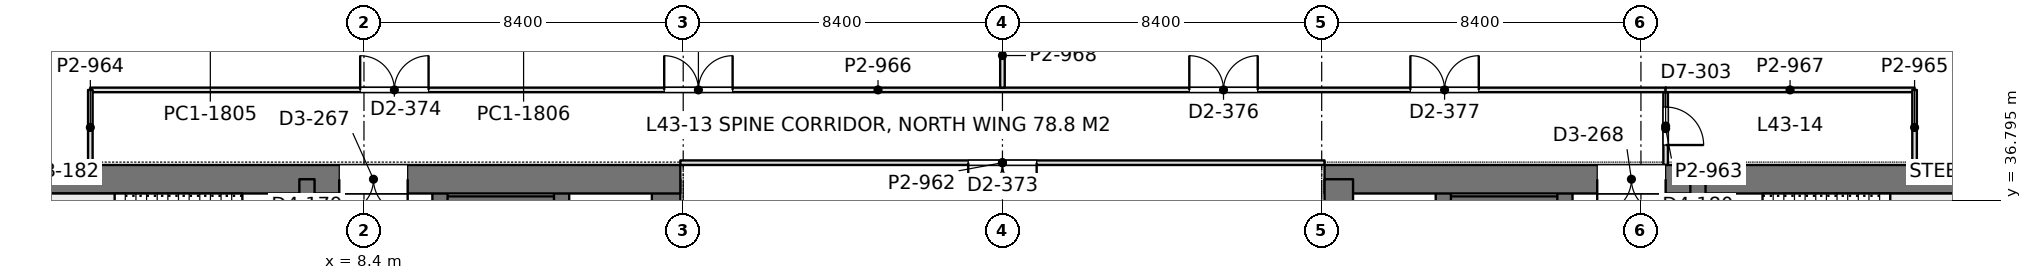
"""IFC4 building model, lengths in metres.
Left out: names, types, materials, properties, quantities, classifications, styles, units other than length and angle.
Written with IfcOpenShell. Run it as: python <this file> out.ifc"""

import sys

from ifc_helpers import new_model, si_unit, direction, frame, frame_2d, origin, place, context, subcontext, project, spatial, rectangle, extrude, element, fill, save


model = new_model("IFC4")
c1 = context("Model", 3, precision=1e-05, world=origin(), true_north=direction((0.0, 1.0)))
c2 = subcontext(c1, "Body", "Model", "MODEL_VIEW")
j1 = project(units=[si_unit("LENGTHUNIT", "METRE"), si_unit("PLANEANGLEUNIT", "RADIAN")], contexts=[c1])
p1 = place(None, origin())
s1 = spatial("IfcSite", under=j1, at=p1, CompositionType="ELEMENT")
p2 = place(p1, origin())
s2 = spatial("IfcBuilding", under=s1, at=p2, CompositionType="ELEMENT")
p3 = place(p2, frame((0.0, 0.0, 190.2)))
s3 = spatial("IfcBuildingStorey", under=s2, at=p3, CompositionType="ELEMENT", Elevation=190.2)
p4 = place(p3, frame((-1.125, 37.35, 0.0), z_axis=(0.0, 0.0, 1.0), x_axis=(1.0, 0.0, 0.0)))
e1 = element("IfcWall", 1, at=p4, inside=s3, PredefinedType="SHEAR", context=c2, shape_type="SweptSolid", body=[
    extrude(rectangle(XDim=17.85, YDim=0.75, at=frame_2d((8.925, 0.0))), origin(), (0.0, 0.0, 1.0), 4.2),
])
p5 = place(p4, frame((8.875, 0.0, 0.0)))
e2 = element("IfcOpeningElement", 2, at=p5, cuts=e1, PredefinedType="OPENING", context=c2, shape_type="SweptSolid", body=[
    extrude(rectangle(XDim=1.8, YDim=2.4, at=frame_2d((0.9, 1.2))), frame((0.0, 0.385, 0.0), z_axis=(0.0, -1.0, 0.0), x_axis=(1.0, 0.0, 0.0)), (0.0, 0.0, 1.0), 0.77),
])
p6 = place(p3, frame((16.35, 27.8, 0.0), z_axis=(0.0, 0.0, 1.0), x_axis=(0.0, 1.0, 0.0)))
e3 = element("IfcWall", 3, at=p6, inside=s3, PredefinedType="SHEAR", context=c2, shape_type="SweptSolid", body=[
    extrude(rectangle(XDim=9.55, YDim=0.75, at=frame_2d((4.775, 0.0))), origin(), (0.0, 0.0, 1.0), 4.2),
])
p7 = place(p3, frame((6.9, 13.05, 0.0), z_axis=(0.0, 0.0, 1.0), x_axis=(0.0, 1.0, 0.0)))
e4 = element("IfcWall", 4, at=p7, inside=s3, PredefinedType="SHEAR", context=c2, shape_type="SweptSolid", body=[
    extrude(rectangle(XDim=24.3, YDim=0.4, at=frame_2d((12.15, 0.0))), origin(), (0.0, 0.0, 1.0), 4.2),
])
p8 = place(p7, frame((1.3, 0.0, 0.0)))
e5 = element("IfcOpeningElement", 5, at=p8, cuts=e4, PredefinedType="OPENING", context=c2, shape_type="SweptSolid", body=[
    extrude(rectangle(XDim=1.0, YDim=2.2, at=frame_2d((0.5, 1.1))), frame((0.0, 0.21, 0.0), z_axis=(0.0, -1.0, 0.0), x_axis=(1.0, 0.0, 0.0)), (0.0, 0.0, 1.0), 0.42),
])
p9 = place(p7, frame((22.0, 0.0, 0.0)))
e6 = element("IfcOpeningElement", 6, at=p9, cuts=e4, PredefinedType="OPENING", context=c2, shape_type="SweptSolid", body=[
    extrude(rectangle(XDim=1.0, YDim=2.2, at=frame_2d((0.5, 1.1))), frame((0.0, 0.21, 0.0), z_axis=(0.0, -1.0, 0.0), x_axis=(1.0, 0.0, 0.0)), (0.0, 0.0, 1.0), 0.42),
])
p10 = place(p7, frame((5.55, 0.0, 0.0)))
e7 = element("IfcOpeningElement", 7, at=p10, cuts=e4, PredefinedType="OPENING", context=c2, shape_type="SweptSolid", body=[
    extrude(rectangle(XDim=1.0, YDim=2.2, at=frame_2d((0.5, 1.1))), frame((0.0, 0.21, 0.0), z_axis=(0.0, -1.0, 0.0), x_axis=(1.0, 0.0, 0.0)), (0.0, 0.0, 1.0), 0.42),
])
p11 = place(p7, frame((9.55, 0.0, 0.0)))
e8 = element("IfcOpeningElement", 8, at=p11, cuts=e4, PredefinedType="OPENING", context=c2, shape_type="SweptSolid", body=[
    extrude(rectangle(XDim=1.0, YDim=2.2, at=frame_2d((0.5, 1.1))), frame((0.0, 0.21, 0.0), z_axis=(0.0, -1.0, 0.0), x_axis=(1.0, 0.0, 0.0)), (0.0, 0.0, 1.0), 0.42),
])
p12 = place(p7, frame((12.8, 0.0, 0.0)))
e9 = element("IfcOpeningElement", 9, at=p12, cuts=e4, PredefinedType="OPENING", context=c2, shape_type="SweptSolid", body=[
    extrude(rectangle(XDim=1.1, YDim=2.2, at=frame_2d((0.55, 1.1))), frame((0.0, 0.21, 0.0), z_axis=(0.0, -1.0, 0.0), x_axis=(1.0, 0.0, 0.0)), (0.0, 0.0, 1.0), 0.42),
])
p13 = place(p7, frame((15.538, 0.0, 0.0)))
e10 = element("IfcOpeningElement", 10, at=p13, cuts=e4, PredefinedType="OPENING", context=c2, shape_type="SweptSolid", body=[
    extrude(rectangle(XDim=1.1, YDim=2.2, at=frame_2d((0.55, 1.1))), frame((0.0, 0.21, 0.0), z_axis=(0.0, -1.0, 0.0), x_axis=(1.0, 0.0, 0.0)), (0.0, 0.0, 1.0), 0.42),
])
p14 = place(p7, frame((18.262, 0.0, 0.0)))
e11 = element("IfcOpeningElement", 11, at=p14, cuts=e4, PredefinedType="OPENING", context=c2, shape_type="SweptSolid", body=[
    extrude(rectangle(XDim=1.1, YDim=2.2, at=frame_2d((0.55, 1.1))), frame((0.0, 0.21, 0.0), z_axis=(0.0, -1.0, 0.0), x_axis=(1.0, 0.0, 0.0)), (0.0, 0.0, 1.0), 0.42),
])
p15 = place(p3, frame((10.4, 13.05, 0.0), z_axis=(0.0, 0.0, 1.0), x_axis=(0.0, 1.0, 0.0)))
e12 = element("IfcWall", 12, at=p15, inside=s3, PredefinedType="SHEAR", context=c2, shape_type="SweptSolid", body=[
    extrude(rectangle(XDim=24.3, YDim=0.4, at=frame_2d((12.15, 0.0))), origin(), (0.0, 0.0, 1.0), 4.2),
])
p16 = place(p15, frame((15.75, 0.0, 0.0)))
e13 = element("IfcOpeningElement", 13, at=p16, cuts=e12, PredefinedType="OPENING", context=c2, shape_type="SweptSolid", body=[
    extrude(rectangle(XDim=1.1, YDim=2.2, at=frame_2d((0.55, 1.1))), frame((0.0, 0.21, 0.0), z_axis=(0.0, -1.0, 0.0), x_axis=(1.0, 0.0, 0.0)), (0.0, 0.0, 1.0), 0.42),
])
p17 = place(p15, frame((18.6, 0.0, 0.0)))
e14 = element("IfcOpeningElement", 14, at=p17, cuts=e12, PredefinedType="OPENING", context=c2, shape_type="SweptSolid", body=[
    extrude(rectangle(XDim=1.1, YDim=2.2, at=frame_2d((0.55, 1.1))), frame((0.0, 0.21, 0.0), z_axis=(0.0, -1.0, 0.0), x_axis=(1.0, 0.0, 0.0)), (0.0, 0.0, 1.0), 0.42),
])
p18 = place(p15, frame((21.45, 0.0, 0.0)))
e15 = element("IfcOpeningElement", 15, at=p18, cuts=e12, PredefinedType="OPENING", context=c2, shape_type="SweptSolid", body=[
    extrude(rectangle(XDim=1.1, YDim=2.2, at=frame_2d((0.55, 1.1))), frame((0.0, 0.21, 0.0), z_axis=(0.0, -1.0, 0.0), x_axis=(1.0, 0.0, 0.0)), (0.0, 0.0, 1.0), 0.42),
])
p19 = place(p15, frame((8.65, 0.0, 0.0)))
e16 = element("IfcOpeningElement", 16, at=p19, cuts=e12, PredefinedType="OPENING", context=c2, shape_type="SweptSolid", body=[
    extrude(rectangle(XDim=1.8, YDim=2.4, at=frame_2d((0.9, 1.2))), frame((0.0, 0.21, 0.0), z_axis=(0.0, -1.0, 0.0), x_axis=(1.0, 0.0, 0.0)), (0.0, 0.0, 1.0), 0.42),
])
p20 = place(p3, frame((13.6, 27.925, 0.0), z_axis=(0.0, 0.0, 1.0), x_axis=(0.0, 1.0, 0.0)))
e17 = element("IfcWall", 17, at=p20, inside=s3, PredefinedType="SHEAR", context=c2, shape_type="SweptSolid", body=[
    extrude(rectangle(XDim=9.425, YDim=0.4, at=frame_2d((4.712, 0.0))), origin(), (0.0, 0.0, 1.0), 4.2),
])
p21 = place(p3, frame((10.4, 36.625, 0.0), z_axis=(0.0, 0.0, 1.0), x_axis=(1.0, 0.0, 0.0)))
e18 = element("IfcWall", 18, at=p21, inside=s3, PredefinedType="SHEAR", context=c2, shape_type="SweptSolid", body=[
    extrude(rectangle(XDim=3.2, YDim=0.55, at=frame_2d((1.6, 0.0))), origin(), (0.0, 0.0, 1.0), 4.2),
])
p22 = place(p3, frame((33.675, 37.35, 0.0), z_axis=(0.0, 0.0, 1.0), x_axis=(1.0, 0.0, 0.0)))
e19 = element("IfcWall", 19, at=p22, inside=s3, PredefinedType="SHEAR", context=c2, shape_type="SweptSolid", body=[
    extrude(rectangle(XDim=17.85, YDim=0.75, at=frame_2d((8.925, 0.0))), origin(), (0.0, 0.0, 1.0), 4.2),
])
p23 = place(p22, frame((7.175, 0.0, 0.0)))
e20 = element("IfcOpeningElement", 20, at=p23, cuts=e19, PredefinedType="OPENING", context=c2, shape_type="SweptSolid", body=[
    extrude(rectangle(XDim=1.8, YDim=2.4, at=frame_2d((0.9, 1.2))), frame((0.0, 0.385, 0.0), z_axis=(0.0, -1.0, 0.0), x_axis=(1.0, 0.0, 0.0)), (0.0, 0.0, 1.0), 0.77),
])
p24 = place(p3, frame((34.05, 27.8, 0.0), z_axis=(0.0, 0.0, 1.0), x_axis=(0.0, 1.0, 0.0)))
e21 = element("IfcWall", 21, at=p24, inside=s3, PredefinedType="SHEAR", context=c2, shape_type="SweptSolid", body=[
    extrude(rectangle(XDim=9.55, YDim=0.75, at=frame_2d((4.775, 0.0))), origin(), (0.0, 0.0, 1.0), 4.2),
])
p25 = place(p3, frame((43.5, 13.05, 0.0), z_axis=(0.0, 0.0, 1.0), x_axis=(0.0, 1.0, 0.0)))
e22 = element("IfcWall", 22, at=p25, inside=s3, PredefinedType="SHEAR", context=c2, shape_type="SweptSolid", body=[
    extrude(rectangle(XDim=24.3, YDim=0.4, at=frame_2d((12.15, 0.0))), origin(), (0.0, 0.0, 1.0), 4.2),
])
p26 = place(p25, frame((1.3, 0.0, 0.0)))
e23 = element("IfcOpeningElement", 23, at=p26, cuts=e22, PredefinedType="OPENING", context=c2, shape_type="SweptSolid", body=[
    extrude(rectangle(XDim=1.0, YDim=2.2, at=frame_2d((0.5, 1.1))), frame((0.0, 0.21, 0.0), z_axis=(0.0, -1.0, 0.0), x_axis=(1.0, 0.0, 0.0)), (0.0, 0.0, 1.0), 0.42),
])
p27 = place(p25, frame((22.0, 0.0, 0.0)))
e24 = element("IfcOpeningElement", 24, at=p27, cuts=e22, PredefinedType="OPENING", context=c2, shape_type="SweptSolid", body=[
    extrude(rectangle(XDim=1.0, YDim=2.2, at=frame_2d((0.5, 1.1))), frame((0.0, 0.21, 0.0), z_axis=(0.0, -1.0, 0.0), x_axis=(1.0, 0.0, 0.0)), (0.0, 0.0, 1.0), 0.42),
])
p28 = place(p25, frame((5.55, 0.0, 0.0)))
e25 = element("IfcOpeningElement", 25, at=p28, cuts=e22, PredefinedType="OPENING", context=c2, shape_type="SweptSolid", body=[
    extrude(rectangle(XDim=1.0, YDim=2.2, at=frame_2d((0.5, 1.1))), frame((0.0, 0.21, 0.0), z_axis=(0.0, -1.0, 0.0), x_axis=(1.0, 0.0, 0.0)), (0.0, 0.0, 1.0), 0.42),
])
p29 = place(p25, frame((9.55, 0.0, 0.0)))
e26 = element("IfcOpeningElement", 26, at=p29, cuts=e22, PredefinedType="OPENING", context=c2, shape_type="SweptSolid", body=[
    extrude(rectangle(XDim=1.0, YDim=2.2, at=frame_2d((0.5, 1.1))), frame((0.0, 0.21, 0.0), z_axis=(0.0, -1.0, 0.0), x_axis=(1.0, 0.0, 0.0)), (0.0, 0.0, 1.0), 0.42),
])
p30 = place(p25, frame((12.8, 0.0, 0.0)))
e27 = element("IfcOpeningElement", 27, at=p30, cuts=e22, PredefinedType="OPENING", context=c2, shape_type="SweptSolid", body=[
    extrude(rectangle(XDim=1.1, YDim=2.2, at=frame_2d((0.55, 1.1))), frame((0.0, 0.21, 0.0), z_axis=(0.0, -1.0, 0.0), x_axis=(1.0, 0.0, 0.0)), (0.0, 0.0, 1.0), 0.42),
])
p31 = place(p25, frame((15.538, 0.0, 0.0)))
e28 = element("IfcOpeningElement", 28, at=p31, cuts=e22, PredefinedType="OPENING", context=c2, shape_type="SweptSolid", body=[
    extrude(rectangle(XDim=1.1, YDim=2.2, at=frame_2d((0.55, 1.1))), frame((0.0, 0.21, 0.0), z_axis=(0.0, -1.0, 0.0), x_axis=(1.0, 0.0, 0.0)), (0.0, 0.0, 1.0), 0.42),
])
p32 = place(p25, frame((18.262, 0.0, 0.0)))
e29 = element("IfcOpeningElement", 29, at=p32, cuts=e22, PredefinedType="OPENING", context=c2, shape_type="SweptSolid", body=[
    extrude(rectangle(XDim=1.1, YDim=2.2, at=frame_2d((0.55, 1.1))), frame((0.0, 0.21, 0.0), z_axis=(0.0, -1.0, 0.0), x_axis=(1.0, 0.0, 0.0)), (0.0, 0.0, 1.0), 0.42),
])
p33 = place(p3, frame((40.0, 13.05, 0.0), z_axis=(0.0, 0.0, 1.0), x_axis=(0.0, 1.0, 0.0)))
e30 = element("IfcWall", 30, at=p33, inside=s3, PredefinedType="SHEAR", context=c2, shape_type="SweptSolid", body=[
    extrude(rectangle(XDim=24.3, YDim=0.4, at=frame_2d((12.15, 0.0))), origin(), (0.0, 0.0, 1.0), 4.2),
])
p34 = place(p33, frame((15.75, 0.0, 0.0)))
e31 = element("IfcOpeningElement", 31, at=p34, cuts=e30, PredefinedType="OPENING", context=c2, shape_type="SweptSolid", body=[
    extrude(rectangle(XDim=1.1, YDim=2.2, at=frame_2d((0.55, 1.1))), frame((0.0, 0.21, 0.0), z_axis=(0.0, -1.0, 0.0), x_axis=(1.0, 0.0, 0.0)), (0.0, 0.0, 1.0), 0.42),
])
p35 = place(p33, frame((18.6, 0.0, 0.0)))
e32 = element("IfcOpeningElement", 32, at=p35, cuts=e30, PredefinedType="OPENING", context=c2, shape_type="SweptSolid", body=[
    extrude(rectangle(XDim=1.1, YDim=2.2, at=frame_2d((0.55, 1.1))), frame((0.0, 0.21, 0.0), z_axis=(0.0, -1.0, 0.0), x_axis=(1.0, 0.0, 0.0)), (0.0, 0.0, 1.0), 0.42),
])
p36 = place(p33, frame((21.45, 0.0, 0.0)))
e33 = element("IfcOpeningElement", 33, at=p36, cuts=e30, PredefinedType="OPENING", context=c2, shape_type="SweptSolid", body=[
    extrude(rectangle(XDim=1.1, YDim=2.2, at=frame_2d((0.55, 1.1))), frame((0.0, 0.21, 0.0), z_axis=(0.0, -1.0, 0.0), x_axis=(1.0, 0.0, 0.0)), (0.0, 0.0, 1.0), 0.42),
])
p37 = place(p33, frame((8.65, 0.0, 0.0)))
e34 = element("IfcOpeningElement", 34, at=p37, cuts=e30, PredefinedType="OPENING", context=c2, shape_type="SweptSolid", body=[
    extrude(rectangle(XDim=1.8, YDim=2.4, at=frame_2d((0.9, 1.2))), frame((0.0, 0.21, 0.0), z_axis=(0.0, -1.0, 0.0), x_axis=(1.0, 0.0, 0.0)), (0.0, 0.0, 1.0), 0.42),
])
p38 = place(p3, frame((36.8, 27.925, 0.0), z_axis=(0.0, 0.0, 1.0), x_axis=(0.0, 1.0, 0.0)))
e35 = element("IfcWall", 35, at=p38, inside=s3, PredefinedType="SHEAR", context=c2, shape_type="SweptSolid", body=[
    extrude(rectangle(XDim=9.425, YDim=0.4, at=frame_2d((4.712, 0.0))), origin(), (0.0, 0.0, 1.0), 4.2),
])
p39 = place(p3, frame((40.0, 36.625, 0.0), z_axis=(0.0, 0.0, 1.0), x_axis=(-1.0, 0.0, 0.0)))
e36 = element("IfcWall", 36, at=p39, inside=s3, PredefinedType="SHEAR", context=c2, shape_type="SweptSolid", body=[
    extrude(rectangle(XDim=3.2, YDim=0.55, at=frame_2d((1.6, 0.0))), origin(), (0.0, 0.0, 1.0), 4.2),
])
p40 = place(p3, frame((25.2, 39.758, 0.0), z_axis=(0.0, 0.0, 1.0), x_axis=(0.0, 1.0, 0.0)))
e37 = element("IfcWall", 37, at=p40, inside=s3, PredefinedType="PARTITIONING", context=c2, shape_type="SweptSolid", body=[
    extrude(rectangle(XDim=1.693, YDim=0.12, at=frame_2d((0.846, 0.0))), origin(), (0.0, 0.0, 1.0), 3.55),
])
p41 = place(p3, frame((1.2, 39.7, 0.0), z_axis=(0.0, 0.0, 1.0), x_axis=(1.0, 0.0, 0.0)))
e38 = element("IfcWall", 38, at=p41, inside=s3, PredefinedType="PARTITIONING", context=c2, shape_type="SweptSolid", body=[
    extrude(rectangle(XDim=41.452, YDim=0.12, at=frame_2d((20.726, 0.0))), origin(), (0.0, 0.0, 1.0), 3.55),
])
p42 = place(p41, frame((7.1, 0.0, 0.0)))
e39 = element("IfcOpeningElement", 39, at=p42, cuts=e38, PredefinedType="OPENING", context=c2, shape_type="SweptSolid", body=[
    extrude(rectangle(XDim=1.8, YDim=2.2, at=frame_2d((0.9, 1.1))), frame((0.0, 0.07, 0.0), z_axis=(0.0, -1.0, 0.0), x_axis=(1.0, 0.0, 0.0)), (0.0, 0.0, 1.0), 0.14),
])
p43 = place(p41, frame((15.1, 0.0, 0.0)))
e40 = element("IfcOpeningElement", 40, at=p43, cuts=e38, PredefinedType="OPENING", context=c2, shape_type="SweptSolid", body=[
    extrude(rectangle(XDim=1.8, YDim=2.2, at=frame_2d((0.9, 1.1))), frame((0.0, 0.07, 0.0), z_axis=(0.0, -1.0, 0.0), x_axis=(1.0, 0.0, 0.0)), (0.0, 0.0, 1.0), 0.14),
])
p44 = place(p41, frame((28.917, 0.0, 0.0)))
e41 = element("IfcOpeningElement", 41, at=p44, cuts=e38, PredefinedType="OPENING", context=c2, shape_type="SweptSolid", body=[
    extrude(rectangle(XDim=1.8, YDim=2.2, at=frame_2d((0.9, 1.1))), frame((0.0, 0.07, 0.0), z_axis=(0.0, -1.0, 0.0), x_axis=(1.0, 0.0, 0.0)), (0.0, 0.0, 1.0), 0.14),
])
p45 = place(p41, frame((34.733, 0.0, 0.0)))
e42 = element("IfcOpeningElement", 42, at=p45, cuts=e38, PredefinedType="OPENING", context=c2, shape_type="SweptSolid", body=[
    extrude(rectangle(XDim=1.8, YDim=2.2, at=frame_2d((0.9, 1.1))), frame((0.0, 0.07, 0.0), z_axis=(0.0, -1.0, 0.0), x_axis=(1.0, 0.0, 0.0)), (0.0, 0.0, 1.0), 0.14),
])
p46 = place(p3, frame((1.2, 37.724, 0.0), z_axis=(0.0, 0.0, 1.0), x_axis=(0.0, 1.0, 0.0)))
e43 = element("IfcWall", 43, at=p46, inside=s3, PredefinedType="PARTITIONING", context=c2, shape_type="SweptSolid", body=[
    extrude(rectangle(XDim=1.976, YDim=0.12, at=frame_2d((0.988, 0.0))), origin(), (0.0, 0.0, 1.0), 4.05),
])
p47 = place(p3, frame((42.65, 37.724, 0.0), z_axis=(0.0, 0.0, 1.0), x_axis=(0.0, 1.0, 0.0)))
e44 = element("IfcWall", 44, at=p47, inside=s3, PredefinedType="PARTITIONING", context=c2, shape_type="SweptSolid", body=[
    extrude(rectangle(XDim=1.918, YDim=0.12, at=frame_2d((0.959, 0.0))), origin(), (0.0, 0.0, 1.0), 4.05),
])
p48 = place(p47, frame((0.526, 0.0, 0.0)))
e45 = element("IfcOpeningElement", 45, at=p48, cuts=e44, PredefinedType="OPENING", context=c2, shape_type="SweptSolid", body=[
    extrude(rectangle(XDim=1.0, YDim=2.4, at=frame_2d((0.5, 1.2))), frame((0.0, 0.07, 0.0), z_axis=(0.0, -1.0, 0.0), x_axis=(1.0, 0.0, 0.0)), (0.0, 0.0, 1.0), 0.14),
])
p49 = place(p3, frame((42.648, 39.7, 0.0), z_axis=(0.0, 0.0, 1.0), x_axis=(1.0, 0.0, 0.0)))
e46 = element("IfcWall", 46, at=p49, inside=s3, PredefinedType="PARTITIONING", context=c2, shape_type="SweptSolid", body=[
    extrude(rectangle(XDim=6.552, YDim=0.12, at=frame_2d((3.276, 0.0))), origin(), (0.0, 0.0, 1.0), 3.69),
])
p50 = place(p3, frame((49.2, 37.724, 0.0), z_axis=(0.0, 0.0, 1.0), x_axis=(0.0, 1.0, 0.0)))
e47 = element("IfcWall", 47, at=p50, inside=s3, PredefinedType="PARTITIONING", context=c2, shape_type="SweptSolid", body=[
    extrude(rectangle(XDim=1.976, YDim=0.12, at=frame_2d((0.988, 0.0))), origin(), (0.0, 0.0, 1.0), 4.05),
])
p51 = place(p3, frame((16.725, 37.785, 0.0), z_axis=(0.0, 0.0, 1.0), x_axis=(1.0, 0.0, 0.0)))
e48 = element("IfcWall", 48, at=p51, inside=s3, PredefinedType="PARTITIONING", context=c2, shape_type="SweptSolid", body=[
    extrude(rectangle(XDim=16.95, YDim=0.12, at=frame_2d((8.475, 0.0))), origin(), (0.0, 0.0, 1.0), 3.55),
])
p52 = place(p51, frame((7.575, 0.0, 0.0)))
e49 = element("IfcOpeningElement", 49, at=p52, cuts=e48, PredefinedType="OPENING", context=c2, shape_type="SweptSolid", body=[
    extrude(rectangle(XDim=1.8, YDim=2.2, at=frame_2d((0.9, 1.1))), frame((0.0, 0.07, 0.0), z_axis=(0.0, -1.0, 0.0), x_axis=(1.0, 0.0, 0.0)), (0.0, 0.0, 1.0), 0.14),
])
p53 = place(p5, frame((1.8, 0.0, 0.0), z_axis=(0.0, 0.0, 1.0), x_axis=(-1.0, 0.0, 0.0)))
e50 = element("IfcDoor", 50, at=p53, inside=s3, OperationType="DOUBLE_DOOR_SINGLE_SWING", PredefinedType="DOOR", context=c2, shape_type="SweptSolid", body=[
    extrude(rectangle(XDim=1.8, YDim=2.4, at=frame_2d((0.9, 1.2))), frame((0.0, 0.025, 0.0), z_axis=(0.0, -1.0, 0.0), x_axis=(1.0, 0.0, 0.0)), (0.0, 0.0, 1.0), 0.05),
])
fill(e2, e50)
p54 = place(p23, frame((1.8, 0.0, 0.0), z_axis=(0.0, 0.0, 1.0), x_axis=(-1.0, 0.0, 0.0)))
e51 = element("IfcDoor", 51, at=p54, inside=s3, OperationType="DOUBLE_DOOR_SINGLE_SWING", PredefinedType="DOOR", context=c2, shape_type="SweptSolid", body=[
    extrude(rectangle(XDim=1.8, YDim=2.4, at=frame_2d((0.9, 1.2))), frame((0.0, 0.025, 0.0), z_axis=(0.0, -1.0, 0.0), x_axis=(1.0, 0.0, 0.0)), (0.0, 0.0, 1.0), 0.05),
])
fill(e20, e51)
p55 = place(p42, origin())
e52 = element("IfcDoor", 52, at=p55, inside=s3, OperationType="DOUBLE_DOOR_SINGLE_SWING", PredefinedType="DOOR", context=c2, shape_type="SweptSolid", body=[
    extrude(rectangle(XDim=1.8, YDim=2.2, at=frame_2d((0.9, 1.1))), frame((0.0, 0.025, 0.0), z_axis=(0.0, -1.0, 0.0), x_axis=(1.0, 0.0, 0.0)), (0.0, 0.0, 1.0), 0.05),
])
fill(e39, e52)
p56 = place(p43, origin())
e53 = element("IfcDoor", 53, at=p56, inside=s3, OperationType="DOUBLE_DOOR_SINGLE_SWING", PredefinedType="DOOR", context=c2, shape_type="SweptSolid", body=[
    extrude(rectangle(XDim=1.8, YDim=2.2, at=frame_2d((0.9, 1.1))), frame((0.0, 0.025, 0.0), z_axis=(0.0, -1.0, 0.0), x_axis=(1.0, 0.0, 0.0)), (0.0, 0.0, 1.0), 0.05),
])
fill(e40, e53)
p57 = place(p44, origin())
e54 = element("IfcDoor", 54, at=p57, inside=s3, OperationType="DOUBLE_DOOR_SINGLE_SWING", PredefinedType="DOOR", context=c2, shape_type="SweptSolid", body=[
    extrude(rectangle(XDim=1.8, YDim=2.2, at=frame_2d((0.9, 1.1))), frame((0.0, 0.025, 0.0), z_axis=(0.0, -1.0, 0.0), x_axis=(1.0, 0.0, 0.0)), (0.0, 0.0, 1.0), 0.05),
])
fill(e41, e54)
p58 = place(p45, origin())
e55 = element("IfcDoor", 55, at=p58, inside=s3, OperationType="DOUBLE_DOOR_SINGLE_SWING", PredefinedType="DOOR", context=c2, shape_type="SweptSolid", body=[
    extrude(rectangle(XDim=1.8, YDim=2.2, at=frame_2d((0.9, 1.1))), frame((0.0, 0.025, 0.0), z_axis=(0.0, -1.0, 0.0), x_axis=(1.0, 0.0, 0.0)), (0.0, 0.0, 1.0), 0.05),
])
fill(e42, e55)
p59 = place(p48, frame((1.0, 0.0, 0.0), z_axis=(0.0, 0.0, 1.0), x_axis=(-1.0, 0.0, 0.0)))
e56 = element("IfcDoor", 56, at=p59, inside=s3, OperationType="SINGLE_SWING_RIGHT", PredefinedType="DOOR", context=c2, shape_type="SweptSolid", body=[
    extrude(rectangle(XDim=1.0, YDim=2.4, at=frame_2d((0.5, 1.2))), frame((0.0, 0.025, 0.0), z_axis=(0.0, -1.0, 0.0), x_axis=(1.0, 0.0, 0.0)), (0.0, 0.0, 1.0), 0.05),
])
fill(e45, e56)
p60 = place(p52, frame((1.8, 0.0, 0.0), z_axis=(0.0, 0.0, 1.0), x_axis=(-1.0, 0.0, 0.0)))
e57 = element("IfcDoor", 57, at=p60, inside=s3, OperationType="DOUBLE_DOOR_SINGLE_SWING", PredefinedType="DOOR", context=c2, shape_type="SweptSolid", body=[
    extrude(rectangle(XDim=1.8, YDim=2.2, at=frame_2d((0.9, 1.1))), frame((0.0, 0.025, 0.0), z_axis=(0.0, -1.0, 0.0), x_axis=(1.0, 0.0, 0.0)), (0.0, 0.0, 1.0), 0.05),
])
fill(e49, e57)
save(model, sys.argv[1])
